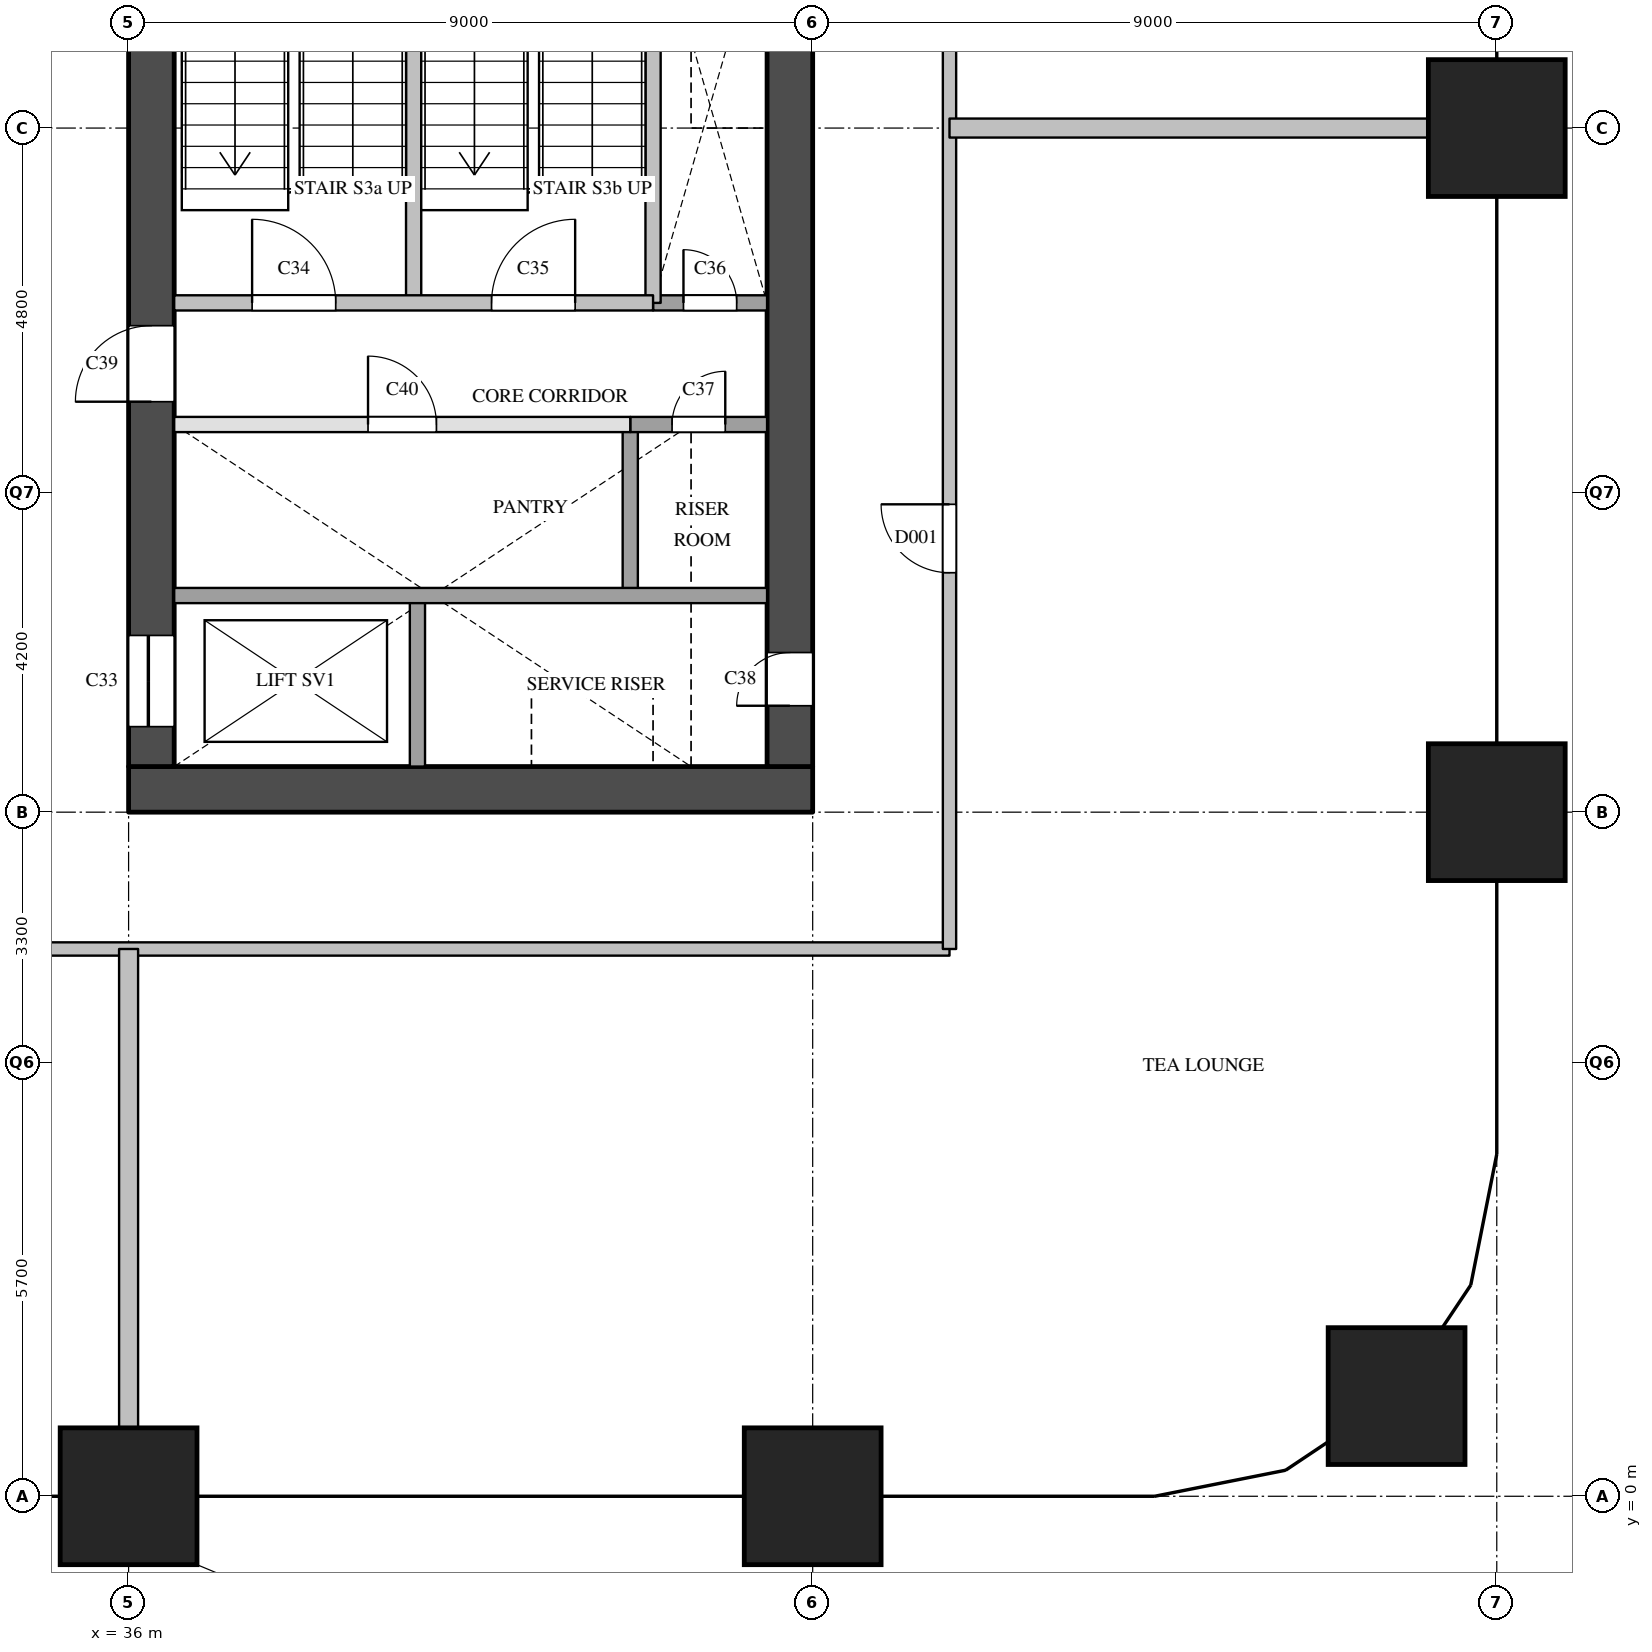
"""IFC4 building model, lengths in metres.
Left out: names, types, materials, properties, quantities, classifications, styles, units other than length and angle.
Written with IfcOpenShell. Run it as: python <this file> out.ifc"""

import sys

from ifc_helpers import new_model, si_unit, direction, frame, frame_2d, origin, origin_2d, place, context, subcontext, project, spatial, rectangle, extrude, element, fill, save


model = new_model("IFC4")
c1 = context("Model", 3, precision=1e-05, world=origin(), true_north=direction((0.0, 1.0)))
c2 = subcontext(c1, "Body", "Model", "MODEL_VIEW")
j1 = project(units=[si_unit("LENGTHUNIT", "METRE"), si_unit("PLANEANGLEUNIT", "RADIAN")], contexts=[c1])
p1 = place(None, origin())
s1 = spatial("IfcSite", under=j1, at=p1, CompositionType="ELEMENT")
p2 = place(p1, origin())
s2 = spatial("IfcBuilding", under=s1, at=p2, CompositionType="ELEMENT")
p3 = place(p2, frame((0.0, 0.0, 77.8)))
s3 = spatial("IfcBuildingStorey", under=s2, at=p3, CompositionType="ELEMENT", Elevation=77.8)
for number, where, z_axis, x_axis in (
    (1, (36.0, 0.0, 0.0), (0.0, 0.0, 1.0), (1.0, 0.0, 0.0)),
    (2, (45.0, 0.0, 0.0), (0.0, 0.0, 1.0), (1.0, 0.0, 0.0)),
    (3, (52.682, 1.318, 0.0), (0.0, 0.0, 1.0), (1.0, 0.0, 0.0)),
    (4, (54.0, 9.0, 0.0), (0.0, 0.0, 1.0), (1.0, 0.0, 0.0)),
    (5, (54.0, 18.0, 0.0), (0.0, 0.0, 1.0), (1.0, 0.0, 0.0)),
):
    element("IfcColumn", number, at=place(p3, frame(where, z_axis=z_axis, x_axis=x_axis)), inside=s3, PredefinedType="COLUMN", context=c2, shape_type="SweptSolid", body=[
        extrude(rectangle(XDim=1.8, YDim=1.8, at=origin_2d()), origin(), (0.0, 0.0, 1.0), 3.8),
    ])
p4 = place(p3, frame((36.0, 9.3, 0.0), z_axis=(0.0, 0.0, 1.0), x_axis=(1.0, 0.0, 0.0)))
e6 = element("IfcWall", 6, at=p4, inside=s3, PredefinedType="SHEAR", context=c2, shape_type="SweptSolid", body=[
    extrude(rectangle(XDim=9.0, YDim=0.6, at=frame_2d((4.5, 0.0))), origin(), (0.0, 0.0, 1.0), 3.5),
])
p5 = place(p3, frame((36.3, 9.6, 0.0), z_axis=(0.0, 0.0, 1.0), x_axis=(0.0, 1.0, 0.0)))
e7 = element("IfcWall", 7, at=p5, inside=s3, PredefinedType="SHEAR", context=c2, shape_type="SweptSolid", body=[
    extrude(rectangle(XDim=12.3, YDim=0.6, at=frame_2d((6.15, 0.0))), origin(), (0.0, 0.0, 1.0), 3.5),
])
p6 = place(p5, frame((0.525, 0.0, 0.0)))
e8 = element("IfcOpeningElement", 8, at=p6, cuts=e7, PredefinedType="OPENING", context=c2, shape_type="SweptSolid", body=[
    extrude(rectangle(XDim=1.2, YDim=2.1, at=frame_2d((0.6, 1.05))), frame((0.0, 0.31, 0.0), z_axis=(0.0, -1.0, 0.0), x_axis=(1.0, 0.0, 0.0)), (0.0, 0.0, 1.0), 0.62),
])
p7 = place(p5, frame((4.8, 0.0, 0.0)))
e9 = element("IfcOpeningElement", 9, at=p7, cuts=e7, PredefinedType="OPENING", context=c2, shape_type="SweptSolid", body=[
    extrude(rectangle(XDim=1.0, YDim=2.1, at=frame_2d((0.5, 1.05))), frame((0.0, 0.31, 0.0), z_axis=(0.0, -1.0, 0.0), x_axis=(1.0, 0.0, 0.0)), (0.0, 0.0, 1.0), 0.62),
])
p8 = place(p3, frame((44.7, 9.6, 0.0), z_axis=(0.0, 0.0, 1.0), x_axis=(0.0, 1.0, 0.0)))
e10 = element("IfcWall", 10, at=p8, inside=s3, PredefinedType="SHEAR", context=c2, shape_type="SweptSolid", body=[
    extrude(rectangle(XDim=12.3, YDim=0.6, at=frame_2d((6.15, 0.0))), origin(), (0.0, 0.0, 1.0), 3.5),
])
p9 = place(p8, frame((0.8, 0.0, 0.0)))
e11 = element("IfcOpeningElement", 11, at=p9, cuts=e10, PredefinedType="OPENING", context=c2, shape_type="SweptSolid", body=[
    extrude(rectangle(XDim=0.7, YDim=2.1, at=frame_2d((0.35, 1.05))), frame((0.0, 0.31, 0.0), z_axis=(0.0, -1.0, 0.0), x_axis=(1.0, 0.0, 0.0)), (0.0, 0.0, 1.0), 0.62),
])
p10 = place(p3, frame((39.75, 15.7, 0.0), z_axis=(0.0, 0.0, 1.0), x_axis=(0.0, 1.0, 0.0)))
e12 = element("IfcWall", 12, at=p10, inside=s3, PredefinedType="SOLIDWALL", context=c2, shape_type="SweptSolid", body=[
    extrude(rectangle(XDim=4.3, YDim=0.2, at=frame_2d((2.15, 0.0))), origin(), (0.0, 0.0, 1.0), 3.5),
])
p11 = place(p3, frame((39.8, 9.6, 0.0), z_axis=(0.0, 0.0, 1.0), x_axis=(0.0, 1.0, 0.0)))
e13 = element("IfcWall", 13, at=p11, inside=s3, PredefinedType="SOLIDWALL", context=c2, shape_type="SweptSolid", body=[
    extrude(rectangle(XDim=2.3, YDim=0.2, at=frame_2d((1.15, 0.0))), origin(), (0.0, 0.0, 1.0), 3.5),
])
p12 = place(p3, frame((42.6, 11.9, 0.0), z_axis=(0.0, 0.0, 1.0), x_axis=(0.0, 1.0, 0.0)))
e14 = element("IfcWall", 14, at=p12, inside=s3, PredefinedType="SOLIDWALL", context=c2, shape_type="SweptSolid", body=[
    extrude(rectangle(XDim=2.2, YDim=0.2, at=frame_2d((1.1, 0.0))), origin(), (0.0, 0.0, 1.0), 3.5),
])
p13 = place(p3, frame((42.9, 15.7, 0.0), z_axis=(0.0, 0.0, 1.0), x_axis=(0.0, 1.0, 0.0)))
e15 = element("IfcWall", 15, at=p13, inside=s3, PredefinedType="SOLIDWALL", context=c2, shape_type="SweptSolid", body=[
    extrude(rectangle(XDim=4.3, YDim=0.2, at=frame_2d((2.15, 0.0))), origin(), (0.0, 0.0, 1.0), 3.5),
])
p14 = place(p3, frame((36.6, 11.85, 0.0), z_axis=(0.0, 0.0, 1.0), x_axis=(1.0, 0.0, 0.0)))
e16 = element("IfcWall", 16, at=p14, inside=s3, PredefinedType="SOLIDWALL", context=c2, shape_type="SweptSolid", body=[
    extrude(rectangle(XDim=7.8, YDim=0.2, at=frame_2d((3.9, 0.0))), origin(), (0.0, 0.0, 1.0), 3.5),
])
p15 = place(p3, frame((36.6, 14.1, 0.0), z_axis=(0.0, 0.0, 1.0), x_axis=(1.0, 0.0, 0.0)))
e17 = element("IfcWall", 17, at=p15, inside=s3, PredefinedType="PARTITIONING", context=c2, shape_type="SweptSolid", body=[
    extrude(rectangle(XDim=6.0, YDim=0.2, at=frame_2d((3.0, 0.0))), origin(), (0.0, 0.0, 1.0), 3.5),
])
p16 = place(p15, frame((2.55, 0.0, 0.0)))
e18 = element("IfcOpeningElement", 18, at=p16, cuts=e17, PredefinedType="OPENING", context=c2, shape_type="SweptSolid", body=[
    extrude(rectangle(XDim=0.9, YDim=2.1, at=frame_2d((0.45, 1.05))), frame((0.0, 0.11, 0.0), z_axis=(0.0, -1.0, 0.0), x_axis=(1.0, 0.0, 0.0)), (0.0, 0.0, 1.0), 0.22),
])
p17 = place(p3, frame((42.6, 14.1, 0.0), z_axis=(0.0, 0.0, 1.0), x_axis=(1.0, 0.0, 0.0)))
e19 = element("IfcWall", 19, at=p17, inside=s3, PredefinedType="SOLIDWALL", context=c2, shape_type="SweptSolid", body=[
    extrude(rectangle(XDim=1.8, YDim=0.2, at=frame_2d((0.9, 0.0))), origin(), (0.0, 0.0, 1.0), 3.5),
])
p18 = place(p17, frame((0.55, 0.0, 0.0)))
e20 = element("IfcOpeningElement", 20, at=p18, cuts=e19, PredefinedType="OPENING", context=c2, shape_type="SweptSolid", body=[
    extrude(rectangle(XDim=0.7, YDim=2.1, at=frame_2d((0.35, 1.05))), frame((0.0, 0.11, 0.0), z_axis=(0.0, -1.0, 0.0), x_axis=(1.0, 0.0, 0.0)), (0.0, 0.0, 1.0), 0.22),
])
p19 = place(p3, frame((42.9, 15.7, 0.0), z_axis=(0.0, 0.0, 1.0), x_axis=(1.0, 0.0, 0.0)))
e21 = element("IfcWall", 21, at=p19, inside=s3, PredefinedType="SOLIDWALL", context=c2, shape_type="SweptSolid", body=[
    extrude(rectangle(XDim=1.5, YDim=0.2, at=frame_2d((0.75, 0.0))), origin(), (0.0, 0.0, 1.0), 3.5),
])
p20 = place(p19, frame((0.4, 0.0, 0.0)))
e22 = element("IfcOpeningElement", 22, at=p20, cuts=e21, PredefinedType="OPENING", context=c2, shape_type="SweptSolid", body=[
    extrude(rectangle(XDim=0.7, YDim=2.1, at=frame_2d((0.35, 1.05))), frame((0.0, 0.11, 0.0), z_axis=(0.0, -1.0, 0.0), x_axis=(1.0, 0.0, 0.0)), (0.0, 0.0, 1.0), 0.22),
])
p21 = place(p3, frame((36.6, 15.7, 0.0), z_axis=(0.0, 0.0, 1.0), x_axis=(1.0, 0.0, 0.0)))
e23 = element("IfcWall", 23, at=p21, inside=s3, PredefinedType="SOLIDWALL", context=c2, shape_type="SweptSolid", body=[
    extrude(rectangle(XDim=6.3, YDim=0.2, at=frame_2d((3.15, 0.0))), origin(), (0.0, 0.0, 1.0), 3.5),
])
p22 = place(p21, frame((1.025, 0.0, 0.0)))
e24 = element("IfcOpeningElement", 24, at=p22, cuts=e23, PredefinedType="OPENING", context=c2, shape_type="SweptSolid", body=[
    extrude(rectangle(XDim=1.1, YDim=2.1, at=frame_2d((0.55, 1.05))), frame((0.0, 0.11, 0.0), z_axis=(0.0, -1.0, 0.0), x_axis=(1.0, 0.0, 0.0)), (0.0, 0.0, 1.0), 0.22),
])
p23 = place(p21, frame((4.175, 0.0, 0.0)))
e25 = element("IfcOpeningElement", 25, at=p23, cuts=e23, PredefinedType="OPENING", context=c2, shape_type="SweptSolid", body=[
    extrude(rectangle(XDim=1.1, YDim=2.1, at=frame_2d((0.55, 1.05))), frame((0.0, 0.11, 0.0), z_axis=(0.0, -1.0, 0.0), x_axis=(1.0, 0.0, 0.0)), (0.0, 0.0, 1.0), 0.22),
])
p24 = place(p3, frame((34.2, 7.2, 0.0), z_axis=(0.0, 0.0, 1.0), x_axis=(1.0, 0.0, 0.0)))
e26 = element("IfcWall", 26, at=p24, inside=s3, PredefinedType="PARTITIONING", context=c2, shape_type="SweptSolid", body=[
    extrude(rectangle(XDim=12.6, YDim=0.175, at=frame_2d((6.3, 0.0))), origin(), (0.0, 0.0, 1.0), 3.5),
])
p25 = place(p3, frame((46.8, 7.2, 0.0), z_axis=(0.0, 0.0, 1.0), x_axis=(0.0, 1.0, 0.0)))
e27 = element("IfcWall", 27, at=p25, inside=s3, PredefinedType="PARTITIONING", context=c2, shape_type="SweptSolid", body=[
    extrude(rectangle(XDim=16.49, YDim=0.175, at=frame_2d((8.245, 0.0))), origin(), (0.0, 0.0, 1.0), 3.5),
])
p26 = place(p25, frame((4.95, 0.0, 0.0)))
e28 = element("IfcOpeningElement", 28, at=p26, cuts=e27, PredefinedType="OPENING", context=c2, shape_type="SweptSolid", body=[
    extrude(rectangle(XDim=0.9, YDim=2.1, at=frame_2d((0.45, 1.05))), frame((0.0, 0.097, 0.0), z_axis=(0.0, -1.0, 0.0), x_axis=(1.0, 0.0, 0.0)), (0.0, 0.0, 1.0), 0.195),
])
p27 = place(p25, frame((13.195, 0.0, 0.0)))
e29 = element("IfcOpeningElement", 29, at=p27, cuts=e27, PredefinedType="OPENING", context=c2, shape_type="SweptSolid", body=[
    extrude(rectangle(XDim=0.9, YDim=2.1, at=frame_2d((0.45, 1.05))), frame((0.0, 0.097, 0.0), z_axis=(0.0, -1.0, 0.0), x_axis=(1.0, 0.0, 0.0)), (0.0, 0.0, 1.0), 0.195),
])
for number, where, z_axis, x_axis in (
    (30, (46.8, 18.0, 0.0), (0.0, 0.0, 1.0), (1.0, 0.0, 0.0)),
    (31, (36.0, 0.0, 0.0), (0.0, 0.0, 1.0), (0.0, 1.0, 0.0)),
):
    element("IfcWall", number, at=place(p3, frame(where, z_axis=z_axis, x_axis=x_axis)), inside=s3, PredefinedType="PARTITIONING", context=c2, shape_type="SweptSolid", body=[
        extrude(rectangle(XDim=7.2, YDim=0.25, at=frame_2d((3.6, 0.0))), origin(), (0.0, 0.0, 1.0), 3.5),
    ])
p28 = place(p6, origin())
e32 = element("IfcDoor", 32, at=p28, inside=s3, OperationType="SLIDING_TO_LEFT", PredefinedType="DOOR", context=c2, shape_type="SweptSolid", body=[
    extrude(rectangle(XDim=1.2, YDim=2.1, at=frame_2d((0.6, 1.05))), frame((0.0, 0.025, 0.0), z_axis=(0.0, -1.0, 0.0), x_axis=(1.0, 0.0, 0.0)), (0.0, 0.0, 1.0), 0.05),
])
fill(e8, e32)
p29 = place(p22, origin())
e33 = element("IfcDoor", 33, at=p29, inside=s3, OperationType="SINGLE_SWING_LEFT", PredefinedType="DOOR", context=c2, shape_type="SweptSolid", body=[
    extrude(rectangle(XDim=1.1, YDim=2.1, at=frame_2d((0.55, 1.05))), frame((0.0, 0.025, 0.0), z_axis=(0.0, -1.0, 0.0), x_axis=(1.0, 0.0, 0.0)), (0.0, 0.0, 1.0), 0.05),
])
fill(e24, e33)
p30 = place(p23, origin())
e34 = element("IfcDoor", 34, at=p30, inside=s3, OperationType="SINGLE_SWING_RIGHT", PredefinedType="DOOR", context=c2, shape_type="SweptSolid", body=[
    extrude(rectangle(XDim=1.1, YDim=2.1, at=frame_2d((0.55, 1.05))), frame((0.0, 0.025, 0.0), z_axis=(0.0, -1.0, 0.0), x_axis=(1.0, 0.0, 0.0)), (0.0, 0.0, 1.0), 0.05),
])
fill(e25, e34)
p31 = place(p20, origin())
e35 = element("IfcDoor", 35, at=p31, inside=s3, OperationType="SINGLE_SWING_LEFT", PredefinedType="DOOR", context=c2, shape_type="SweptSolid", body=[
    extrude(rectangle(XDim=0.7, YDim=2.1, at=frame_2d((0.35, 1.05))), frame((0.0, 0.025, 0.0), z_axis=(0.0, -1.0, 0.0), x_axis=(1.0, 0.0, 0.0)), (0.0, 0.0, 1.0), 0.05),
])
fill(e22, e35)
p32 = place(p18, origin())
e36 = element("IfcDoor", 36, at=p32, inside=s3, OperationType="SINGLE_SWING_RIGHT", PredefinedType="DOOR", context=c2, shape_type="SweptSolid", body=[
    extrude(rectangle(XDim=0.7, YDim=2.1, at=frame_2d((0.35, 1.05))), frame((0.0, 0.025, 0.0), z_axis=(0.0, -1.0, 0.0), x_axis=(1.0, 0.0, 0.0)), (0.0, 0.0, 1.0), 0.05),
])
fill(e20, e36)
p33 = place(p9, origin())
e37 = element("IfcDoor", 37, at=p33, inside=s3, OperationType="SINGLE_SWING_LEFT", PredefinedType="DOOR", context=c2, shape_type="SweptSolid", body=[
    extrude(rectangle(XDim=0.7, YDim=2.1, at=frame_2d((0.35, 1.05))), frame((0.0, 0.025, 0.0), z_axis=(0.0, -1.0, 0.0), x_axis=(1.0, 0.0, 0.0)), (0.0, 0.0, 1.0), 0.05),
])
fill(e11, e37)
p34 = place(p7, origin())
e38 = element("IfcDoor", 38, at=p34, inside=s3, OperationType="SINGLE_SWING_LEFT", PredefinedType="DOOR", context=c2, shape_type="SweptSolid", body=[
    extrude(rectangle(XDim=1.0, YDim=2.1, at=frame_2d((0.5, 1.05))), frame((0.0, 0.025, 0.0), z_axis=(0.0, -1.0, 0.0), x_axis=(1.0, 0.0, 0.0)), (0.0, 0.0, 1.0), 0.05),
])
fill(e9, e38)
p35 = place(p16, origin())
e39 = element("IfcDoor", 39, at=p35, inside=s3, OperationType="SINGLE_SWING_LEFT", PredefinedType="DOOR", context=c2, shape_type="SweptSolid", body=[
    extrude(rectangle(XDim=0.9, YDim=2.1, at=frame_2d((0.45, 1.05))), frame((0.0, 0.025, 0.0), z_axis=(0.0, -1.0, 0.0), x_axis=(1.0, 0.0, 0.0)), (0.0, 0.0, 1.0), 0.05),
])
fill(e18, e39)
p36 = place(p26, origin())
e40 = element("IfcDoor", 40, at=p36, inside=s3, OperationType="SINGLE_SWING_RIGHT", PredefinedType="DOOR", context=c2, shape_type="SweptSolid", body=[
    extrude(rectangle(XDim=0.9, YDim=2.1, at=frame_2d((0.45, 1.05))), frame((0.0, 0.025, 0.0), z_axis=(0.0, -1.0, 0.0), x_axis=(1.0, 0.0, 0.0)), (0.0, 0.0, 1.0), 0.05),
])
fill(e28, e40)
save(model, sys.argv[1])
